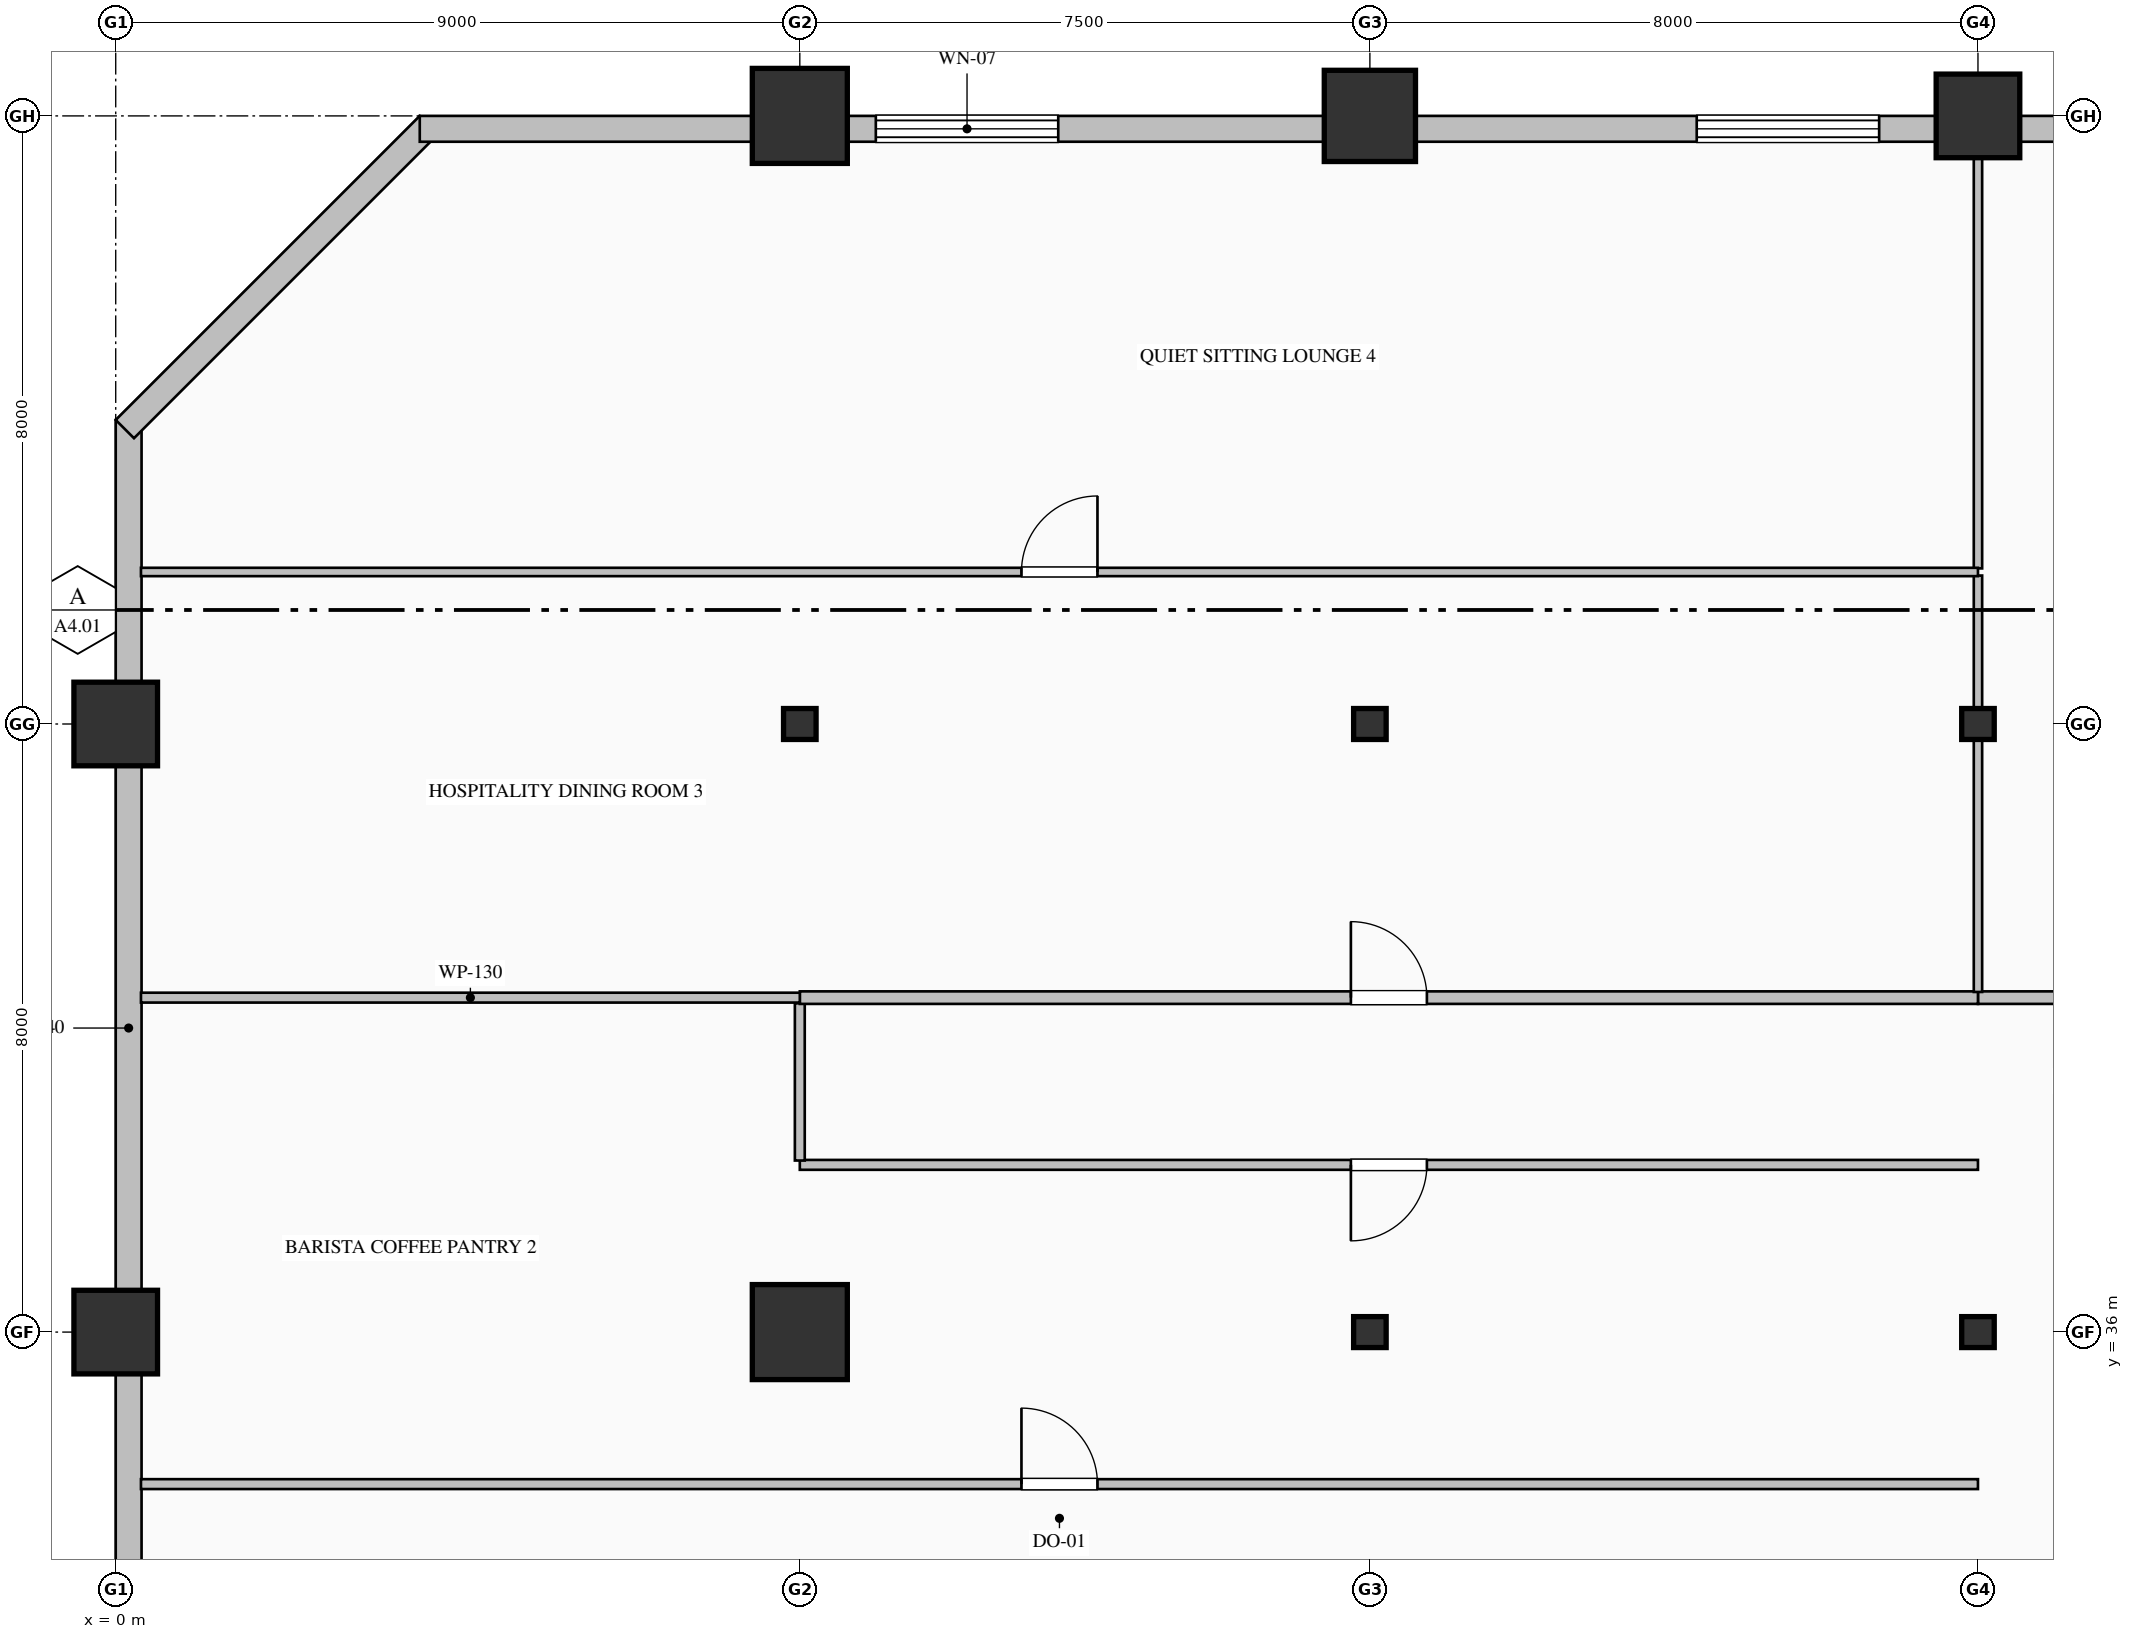
"""IFC4 building model, lengths in metres.
Left out: names, types, materials, properties, quantities, classifications, styles, units other than length and angle.
Written with IfcOpenShell. Run it as: python <this file> out.ifc"""

import sys

from ifc_helpers import new_model, si_unit, direction, frame, frame_2d, origin, origin_2d, place, context, subcontext, project, spatial, rectangle, hollow_rectangle, hollow_circle, i_section, extrude, element, fill, save


model = new_model("IFC4")
c1 = context("Model", 3, precision=1e-05, world=origin(), true_north=direction((0.0, 1.0)))
c2 = subcontext(c1, "Body", "Model", "MODEL_VIEW")
j1 = project(units=[si_unit("LENGTHUNIT", "METRE"), si_unit("PLANEANGLEUNIT", "RADIAN")], contexts=[c1])
p1 = place(None, origin())
s1 = spatial("IfcSite", under=j1, at=p1, CompositionType="ELEMENT")
p2 = place(p1, origin())
s2 = spatial("IfcBuilding", under=s1, at=p2, CompositionType="ELEMENT")
p3 = place(p2, frame((0.0, 0.0, 72.2)))
s3 = spatial("IfcBuildingStorey", under=s2, at=p3, CompositionType="ELEMENT", Elevation=72.2)
for number, where, z_axis, x_axis in (
    (1, (0.0, 36.0, 0.0), (0.0, 0.0, 1.0), (1.0, 0.0, 0.0)),
    (2, (0.0, 44.0, 0.0), (0.0, 0.0, 1.0), (1.0, 0.0, 0.0)),
):
    element("IfcColumn", number, at=place(p3, frame(where, z_axis=z_axis, x_axis=x_axis)), inside=s3, PredefinedType="COLUMN", context=c2, shape_type="SweptSolid", body=[
        extrude(hollow_rectangle(XDim=1.1, YDim=1.1, WallThickness=0.04, at=origin_2d()), origin(), (0.0, 0.0, 1.0), 4.0),
    ])
p4 = place(p3, frame((9.0, 36.0, 0.0), z_axis=(0.0, 0.0, 1.0), x_axis=(1.0, 0.0, 0.0)))
e3 = element("IfcColumn", 3, at=p4, inside=s3, PredefinedType="COLUMN", context=c2, shape_type="SweptSolid", body=[
    extrude(hollow_rectangle(XDim=1.25, YDim=1.25, WallThickness=0.045, at=origin_2d()), origin(), (0.0, 0.0, 1.0), 4.0),
])
p5 = place(p3, frame((9.0, 44.0, 0.0), z_axis=(0.0, 0.0, 1.0), x_axis=(1.0, 0.0, 0.0)))
e4 = element("IfcColumn", 4, at=p5, inside=s3, PredefinedType="COLUMN", context=c2, shape_type="SweptSolid", body=[
    extrude(i_section(OverallWidth=0.407, OverallDepth=0.428, WebThickness=0.02, FlangeThickness=0.035, FilletRadius=0.022, at=origin_2d()), origin(), (0.0, 0.0, 1.0), 4.0),
])
p6 = place(p3, frame((9.0, 52.0, 0.0), z_axis=(0.0, 0.0, 1.0), x_axis=(1.0, 0.0, 0.0)))
e5 = element("IfcColumn", 5, at=p6, inside=s3, PredefinedType="COLUMN", context=c2, shape_type="SweptSolid", body=[
    extrude(hollow_rectangle(XDim=1.25, YDim=1.25, WallThickness=0.045, at=origin_2d()), origin(), (0.0, 0.0, 1.0), 4.0),
])
for number, where, z_axis, x_axis in (
    (6, (16.5, 36.0, 0.0), (0.0, 0.0, 1.0), (1.0, 0.0, 0.0)),
    (7, (16.5, 44.0, 0.0), (0.0, 0.0, 1.0), (1.0, 0.0, 0.0)),
):
    element("IfcColumn", number, at=place(p3, frame(where, z_axis=z_axis, x_axis=x_axis)), inside=s3, PredefinedType="COLUMN", context=c2, shape_type="SweptSolid", body=[
        extrude(i_section(OverallWidth=0.407, OverallDepth=0.428, WebThickness=0.02, FlangeThickness=0.035, FilletRadius=0.022, at=origin_2d()), origin(), (0.0, 0.0, 1.0), 4.0),
    ])
p7 = place(p3, frame((16.5, 52.0, 0.0), z_axis=(0.0, 0.0, 1.0), x_axis=(1.0, 0.0, 0.0)))
e8 = element("IfcColumn", 8, at=p7, inside=s3, PredefinedType="COLUMN", context=c2, shape_type="SweptSolid", body=[
    extrude(hollow_circle(Radius=0.6, WallThickness=0.04, at=origin_2d()), origin(), (0.0, 0.0, 1.0), 4.0),
])
for number, where, z_axis, x_axis in (
    (9, (24.5, 36.0, 0.0), (0.0, 0.0, 1.0), (1.0, 0.0, 0.0)),
    (10, (24.5, 44.0, 0.0), (0.0, 0.0, 1.0), (1.0, 0.0, 0.0)),
):
    element("IfcColumn", number, at=place(p3, frame(where, z_axis=z_axis, x_axis=x_axis)), inside=s3, PredefinedType="COLUMN", context=c2, shape_type="SweptSolid", body=[
        extrude(i_section(OverallWidth=0.407, OverallDepth=0.428, WebThickness=0.02, FlangeThickness=0.035, FilletRadius=0.022, at=origin_2d()), origin(), (0.0, 0.0, 1.0), 4.0),
    ])
p8 = place(p3, frame((24.5, 52.0, 0.0), z_axis=(0.0, 0.0, 1.0), x_axis=(1.0, 0.0, 0.0)))
e11 = element("IfcColumn", 11, at=p8, inside=s3, PredefinedType="COLUMN", context=c2, shape_type="SweptSolid", body=[
    extrude(hollow_rectangle(XDim=1.1, YDim=1.1, WallThickness=0.04, at=origin_2d()), origin(), (0.0, 0.0, 1.0), 4.0),
])
p9 = place(p3, frame((0.17, 32.0, 0.0), z_axis=(0.0, 0.0, 1.0), x_axis=(0.0, 1.0, 0.0)))
e12 = element("IfcWall", 12, at=p9, inside=s3, PredefinedType="SOLIDWALL", context=c2, shape_type="SweptSolid", body=[
    extrude(rectangle(XDim=16.0, YDim=0.34, at=frame_2d((8.0, 0.0))), origin(), (0.0, 0.0, 1.0), 3.25),
])
p10 = place(p3, frame((0.12, 47.88, 0.0), z_axis=(0.0, 0.0, 1.0), x_axis=(0.707106781187, 0.707106781187, 0.0)))
e13 = element("IfcWall", 13, at=p10, inside=s3, PredefinedType="SOLIDWALL", context=c2, shape_type="SweptSolid", body=[
    extrude(rectangle(XDim=5.657, YDim=0.34, at=frame_2d((2.828, 0.0))), origin(), (0.0, 0.0, 1.0), 3.75),
])
p11 = place(p3, frame((4.0, 51.83, 0.0), z_axis=(0.0, 0.0, 1.0), x_axis=(1.0, 0.0, 0.0)))
e14 = element("IfcWall", 14, at=p11, inside=s3, PredefinedType="SOLIDWALL", context=c2, shape_type="SweptSolid", body=[
    extrude(rectangle(XDim=36.52, YDim=0.34, at=frame_2d((18.26, 0.0))), origin(), (0.0, 0.0, 1.0), 3.25),
])
p12 = place(p11, frame((6.0, 0.0, 0.8)))
e15 = element("IfcOpeningElement", 15, at=p12, cuts=e14, PredefinedType="OPENING", context=c2, shape_type="SweptSolid", body=[
    extrude(rectangle(XDim=2.4, YDim=2.15, at=frame_2d((1.2, 1.075))), frame((0.0, 0.18, 0.0), z_axis=(0.0, -1.0, 0.0), x_axis=(1.0, 0.0, 0.0)), (0.0, 0.0, 1.0), 0.36),
])
p13 = place(p11, frame((16.8, 0.0, 0.8)))
e16 = element("IfcOpeningElement", 16, at=p13, cuts=e14, PredefinedType="OPENING", context=c2, shape_type="SweptSolid", body=[
    extrude(rectangle(XDim=2.4, YDim=2.15, at=frame_2d((1.2, 1.075))), frame((0.0, 0.18, 0.0), z_axis=(0.0, -1.0, 0.0), x_axis=(1.0, 0.0, 0.0)), (0.0, 0.0, 1.0), 0.36),
])
p14 = place(p11, frame((24.15, 0.0, 0.85)))
e17 = element("IfcOpeningElement", 17, at=p14, cuts=e14, PredefinedType="OPENING", context=c2, shape_type="SweptSolid", body=[
    extrude(rectangle(XDim=2.1, YDim=2.05, at=frame_2d((1.05, 1.025))), frame((0.0, 0.18, 0.0), z_axis=(0.0, -1.0, 0.0), x_axis=(1.0, 0.0, 0.0)), (0.0, 0.0, 1.0), 0.36),
])
p15 = place(p3, frame((24.5, 40.4, 0.0), z_axis=(0.0, 0.0, 1.0), x_axis=(1.0, 0.0, 0.0)))
e18 = element("IfcWall", 18, at=p15, inside=s3, PredefinedType="PARTITIONING", context=c2, shape_type="SweptSolid", body=[
    extrude(rectangle(XDim=13.3, YDim=0.165, at=frame_2d((6.65, 0.0))), origin(), (0.0, 0.0, 1.0), 3.75),
])
p16 = place(p15, frame((6.15, 0.0, 0.0)))
e19 = element("IfcOpeningElement", 19, at=p16, cuts=e18, PredefinedType="OPENING", context=c2, shape_type="SweptSolid", body=[
    extrude(rectangle(XDim=1.0, YDim=2.15, at=frame_2d((0.5, 1.075))), frame((0.0, 0.093, 0.0), z_axis=(0.0, -1.0, 0.0), x_axis=(1.0, 0.0, 0.0)), (0.0, 0.0, 1.0), 0.185),
])
p17 = place(p3, frame((24.5, 38.2, 0.0), z_axis=(0.0, 0.0, 1.0), x_axis=(-1.0, 0.0, 0.0)))
e20 = element("IfcWall", 20, at=p17, inside=s3, PredefinedType="PARTITIONING", context=c2, shape_type="SweptSolid", body=[
    extrude(rectangle(XDim=15.5, YDim=0.13, at=frame_2d((7.75, 0.0))), origin(), (0.0, 0.0, 1.0), 3.75),
])
p18 = place(p17, frame((7.25, 0.0, 0.0)))
e21 = element("IfcOpeningElement", 21, at=p18, cuts=e20, PredefinedType="OPENING", context=c2, shape_type="SweptSolid", body=[
    extrude(rectangle(XDim=1.0, YDim=2.15, at=frame_2d((0.5, 1.075))), frame((0.0, 0.075, 0.0), z_axis=(0.0, -1.0, 0.0), x_axis=(1.0, 0.0, 0.0)), (0.0, 0.0, 1.0), 0.15),
])
p19 = place(p3, frame((9.0, 38.257, 0.0), z_axis=(0.0, 0.0, 1.0), x_axis=(0.0, 1.0, 0.0)))
e22 = element("IfcWall", 22, at=p19, inside=s3, PredefinedType="PARTITIONING", context=c2, shape_type="SweptSolid", body=[
    extrude(rectangle(XDim=2.068, YDim=0.13, at=frame_2d((1.034, 0.0))), origin(), (0.0, 0.0, 1.0), 3.042),
])
p20 = place(p3, frame((9.0, 40.4, 0.0), z_axis=(0.0, 0.0, 1.0), x_axis=(1.0, 0.0, 0.0)))
e23 = element("IfcWall", 23, at=p20, inside=s3, PredefinedType="PARTITIONING", context=c2, shape_type="SweptSolid", body=[
    extrude(rectangle(XDim=15.5, YDim=0.165, at=frame_2d((7.75, 0.0))), origin(), (0.0, 0.0, 1.0), 3.75),
])
p21 = place(p20, frame((7.25, 0.0, 0.0)))
e24 = element("IfcOpeningElement", 24, at=p21, cuts=e23, PredefinedType="OPENING", context=c2, shape_type="SweptSolid", body=[
    extrude(rectangle(XDim=1.0, YDim=2.15, at=frame_2d((0.5, 1.075))), frame((0.0, 0.093, 0.0), z_axis=(0.0, -1.0, 0.0), x_axis=(1.0, 0.0, 0.0)), (0.0, 0.0, 1.0), 0.185),
])
p22 = place(p3, frame((24.5, 40.475, 0.0), z_axis=(0.0, 0.0, 1.0), x_axis=(0.0, 1.0, 0.0)))
e25 = element("IfcWall", 25, at=p22, inside=s3, PredefinedType="MOVABLE", context=c2, shape_type="SweptSolid", body=[
    extrude(rectangle(XDim=5.478, YDim=0.11, at=frame_2d((2.739, 0.0))), origin(), (0.0, 0.0, 1.0), 3.042),
])
p23 = place(p3, frame((24.5, 46.047, 0.0), z_axis=(0.0, 0.0, 1.0), x_axis=(0.0, 1.0, 0.0)))
e26 = element("IfcWall", 26, at=p23, inside=s3, PredefinedType="MOVABLE", context=c2, shape_type="SweptSolid", body=[
    extrude(rectangle(XDim=5.621, YDim=0.11, at=frame_2d((2.811, 0.0))), origin(), (0.0, 0.0, 1.0), 3.042),
])
p24 = place(p3, frame((0.332, 34.0, 0.0), z_axis=(0.0, 0.0, 1.0), x_axis=(1.0, 0.0, 0.0)))
e27 = element("IfcWall", 27, at=p24, inside=s3, PredefinedType="PARTITIONING", context=c2, shape_type="SweptSolid", body=[
    extrude(rectangle(XDim=24.168, YDim=0.13, at=frame_2d((12.084, 0.0))), origin(), (0.0, 0.0, 1.0), 3.75),
])
p25 = place(p24, frame((11.584, 0.0, 0.0)))
e28 = element("IfcOpeningElement", 28, at=p25, cuts=e27, PredefinedType="OPENING", context=c2, shape_type="SweptSolid", body=[
    extrude(rectangle(XDim=1.0, YDim=2.15, at=frame_2d((0.5, 1.075))), frame((0.0, 0.075, 0.0), z_axis=(0.0, -1.0, 0.0), x_axis=(1.0, 0.0, 0.0)), (0.0, 0.0, 1.0), 0.15),
])
p26 = place(p3, frame((0.332, 40.4, 0.0), z_axis=(0.0, 0.0, 1.0), x_axis=(1.0, 0.0, 0.0)))
e29 = element("IfcWall", 29, at=p26, inside=s3, PredefinedType="PARTITIONING", context=c2, shape_type="SweptSolid", body=[
    extrude(rectangle(XDim=8.668, YDim=0.13, at=frame_2d((4.334, 0.0))), origin(), (0.0, 0.0, 1.0), 3.75),
])
p27 = place(p3, frame((0.332, 46.0, 0.0), z_axis=(0.0, 0.0, 1.0), x_axis=(1.0, 0.0, 0.0)))
e30 = element("IfcWall", 30, at=p27, inside=s3, PredefinedType="MOVABLE", context=c2, shape_type="SweptSolid", body=[
    extrude(rectangle(XDim=24.168, YDim=0.11, at=frame_2d((12.084, 0.0))), origin(), (0.0, 0.0, 1.0), 3.75),
])
p28 = place(p27, frame((11.584, 0.0, 0.0)))
e31 = element("IfcOpeningElement", 31, at=p28, cuts=e30, PredefinedType="OPENING", context=c2, shape_type="SweptSolid", body=[
    extrude(rectangle(XDim=1.0, YDim=2.15, at=frame_2d((0.5, 1.075))), frame((0.0, 0.065, 0.0), z_axis=(0.0, -1.0, 0.0), x_axis=(1.0, 0.0, 0.0)), (0.0, 0.0, 1.0), 0.13),
])
p29 = place(p12, origin())
e32 = element("IfcWindow", 32, at=p29, inside=s3, PartitioningType="TRIPLE_PANEL_VERTICAL", PredefinedType="WINDOW", context=c2, shape_type="SweptSolid", body=[
    extrude(rectangle(XDim=2.4, YDim=2.15, at=frame_2d((1.2, 1.075))), frame((0.0, 0.15, 0.0), z_axis=(0.0, -1.0, 0.0), x_axis=(1.0, 0.0, 0.0)), (0.0, 0.0, 1.0), 0.06),
])
fill(e15, e32)
p30 = place(p13, origin())
e33 = element("IfcWindow", 33, at=p30, inside=s3, PartitioningType="TRIPLE_PANEL_VERTICAL", PredefinedType="WINDOW", context=c2, shape_type="SweptSolid", body=[
    extrude(rectangle(XDim=2.4, YDim=2.15, at=frame_2d((1.2, 1.075))), frame((0.0, 0.15, 0.0), z_axis=(0.0, -1.0, 0.0), x_axis=(1.0, 0.0, 0.0)), (0.0, 0.0, 1.0), 0.06),
])
fill(e16, e33)
p31 = place(p25, origin())
e34 = element("IfcDoor", 34, at=p31, inside=s3, OperationType="SINGLE_SWING_LEFT", PredefinedType="DOOR", context=c2, shape_type="SweptSolid", body=[
    extrude(rectangle(XDim=1.0, YDim=2.15, at=frame_2d((0.5, 1.075))), frame((0.0, 0.025, 0.0), z_axis=(0.0, -1.0, 0.0), x_axis=(1.0, 0.0, 0.0)), (0.0, 0.0, 1.0), 0.05),
])
fill(e28, e34)
p32 = place(p18, origin())
e35 = element("IfcDoor", 35, at=p32, inside=s3, OperationType="SINGLE_SWING_RIGHT", PredefinedType="DOOR", context=c2, shape_type="SweptSolid", body=[
    extrude(rectangle(XDim=1.0, YDim=2.15, at=frame_2d((0.5, 1.075))), frame((0.0, 0.025, 0.0), z_axis=(0.0, -1.0, 0.0), x_axis=(1.0, 0.0, 0.0)), (0.0, 0.0, 1.0), 0.05),
])
fill(e21, e35)
p33 = place(p21, origin())
e36 = element("IfcDoor", 36, at=p33, inside=s3, OperationType="SINGLE_SWING_LEFT", PredefinedType="DOOR", context=c2, shape_type="SweptSolid", body=[
    extrude(rectangle(XDim=1.0, YDim=2.15, at=frame_2d((0.5, 1.075))), frame((0.0, 0.025, 0.0), z_axis=(0.0, -1.0, 0.0), x_axis=(1.0, 0.0, 0.0)), (0.0, 0.0, 1.0), 0.05),
])
fill(e24, e36)
p34 = place(p28, origin())
e37 = element("IfcDoor", 37, at=p34, inside=s3, OperationType="SINGLE_SWING_RIGHT", PredefinedType="DOOR", context=c2, shape_type="SweptSolid", body=[
    extrude(rectangle(XDim=1.0, YDim=2.15, at=frame_2d((0.5, 1.075))), frame((0.0, 0.025, 0.0), z_axis=(0.0, -1.0, 0.0), x_axis=(1.0, 0.0, 0.0)), (0.0, 0.0, 1.0), 0.05),
])
fill(e31, e37)
save(model, sys.argv[1])
